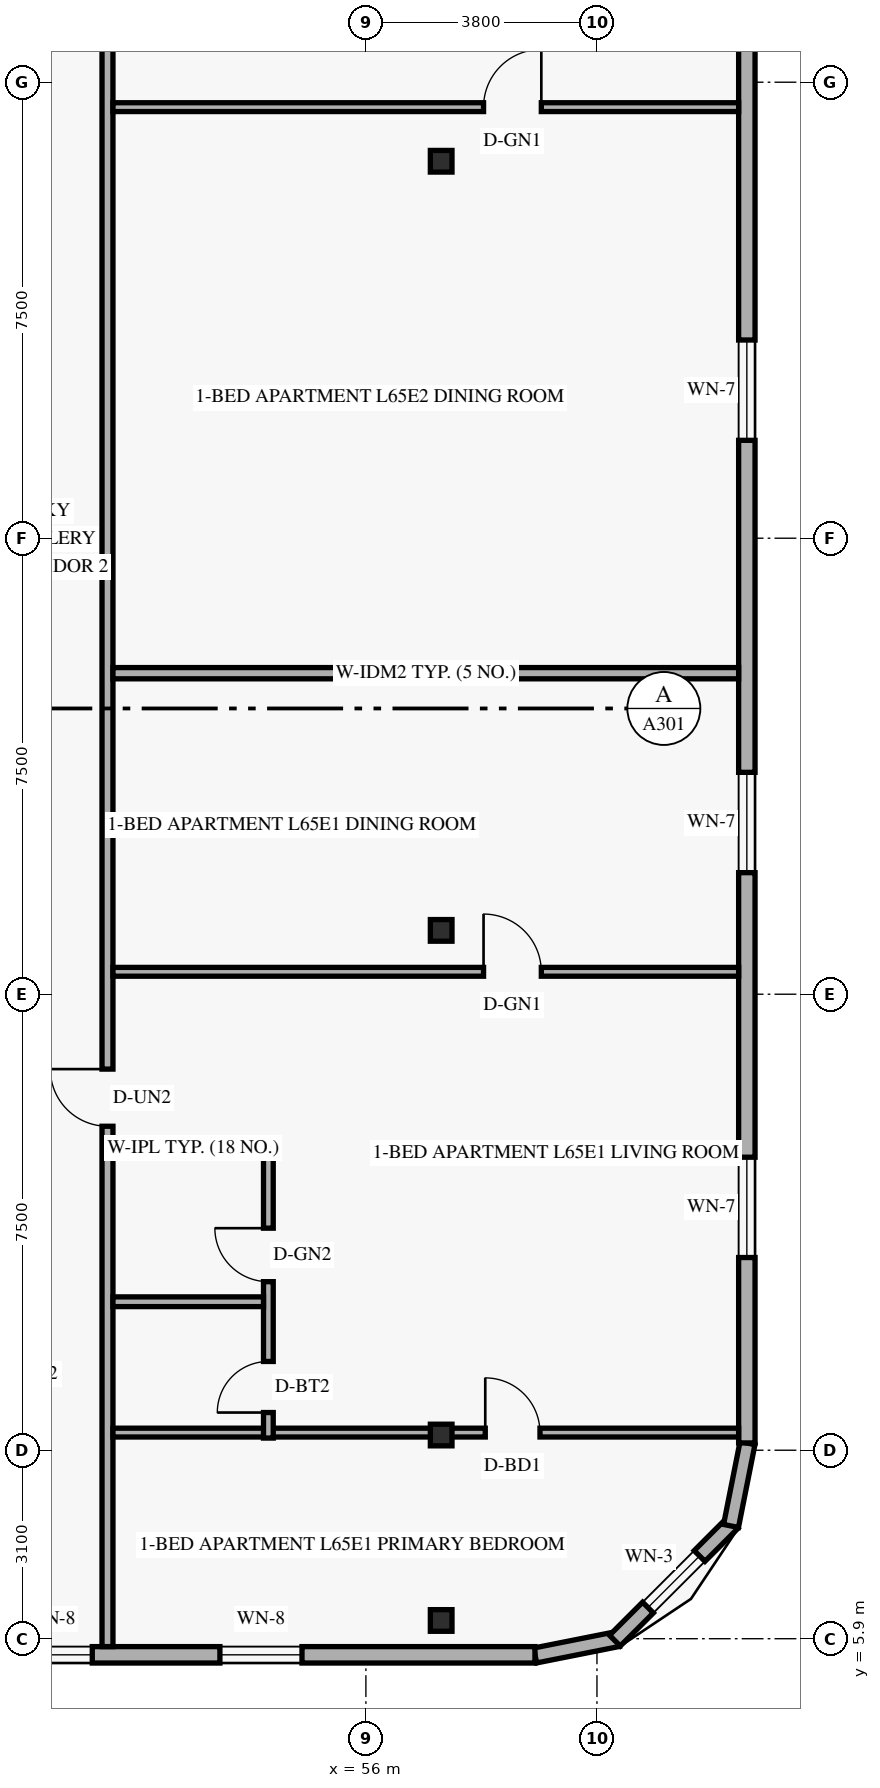
"""IFC4 building model, lengths in metres.
Left out: names, types, materials, properties, quantities, classifications, styles, units other than length and angle.
Written with IfcOpenShell. Run it as: python <this file> out.ifc"""

import sys

from ifc_helpers import new_model, si_unit, direction, frame, frame_2d, origin, origin_2d, place, context, subcontext, project, spatial, rectangle, hollow_rectangle, extrude, element, fill, save


model = new_model("IFC4")
c1 = context("Model", 3, precision=1e-05, world=origin(), true_north=direction((0.0, 1.0)))
c2 = subcontext(c1, "Body", "Model", "MODEL_VIEW")
j1 = project(units=[si_unit("LENGTHUNIT", "METRE"), si_unit("PLANEANGLEUNIT", "RADIAN")], contexts=[c1])
p1 = place(None, origin())
s1 = spatial("IfcSite", under=j1, at=p1, CompositionType="ELEMENT")
p2 = place(p1, origin())
s2 = spatial("IfcBuilding", under=s1, at=p2, CompositionType="ELEMENT")
p3 = place(p2, frame((0.0, 0.0, 249.6)))
s3 = spatial("IfcBuildingStorey", under=s2, at=p3, CompositionType="ELEMENT", Elevation=249.6)
for number, where, z_axis, x_axis in (
    (1, (57.134, 6.2, 0.0), (0.058, 0.0, 0.998), (0.0, 1.0, 0.0)),
    (2, (57.134, 9.25, 0.0), (0.058, 0.0, 0.998), (0.0, 1.0, 0.0)),
    (3, (57.134, 17.55, 0.0), (0.058, 0.0, 0.998), (0.0, 1.0, 0.0)),
    (4, (57.134, 30.2, 0.0), (0.058, 0.0, 0.998), (0.0, 1.0, 0.0)),
):
    element("IfcColumn", number, at=place(p3, frame(where, z_axis=z_axis, x_axis=x_axis)), inside=s3, PredefinedType="COLUMN", context=c2, shape_type="SweptSolid", body=[
        extrude(hollow_rectangle(XDim=0.356, YDim=0.356, WallThickness=0.016, at=origin_2d()), origin(), (0.0, 0.0, 1.0), 3.606),
    ])
p4 = place(p3, frame((58.783, 5.624, 0.0), z_axis=(0.0, 0.0, 1.0), x_axis=(0.980809899341, 0.19496651342, 0.0)))
e5 = element("IfcWall", 5, at=p4, inside=s3, PredefinedType="SOLIDWALL", context=c2, shape_type="SweptSolid", body=[
    extrude(rectangle(XDim=1.389, YDim=0.25, at=frame_2d((0.694, 0.0))), origin(), (0.0, 0.0, 1.0), 3.36),
])
p5 = place(p3, frame((60.095, 5.868, 0.0), z_axis=(0.0, 0.0, 1.0), x_axis=(0.707106781187, 0.707106781187, 0.0)))
e6 = element("IfcWall", 6, at=p5, inside=s3, PredefinedType="SOLIDWALL", context=c2, shape_type="SweptSolid", body=[
    extrude(rectangle(XDim=2.739, YDim=0.25, at=frame_2d((1.37, 0.0))), origin(), (0.0, 0.0, 1.0), 3.36),
])
p6 = place(p5, frame((0.77, 0.0, 0.85)))
e7 = element("IfcOpeningElement", 7, at=p6, cuts=e6, PredefinedType="OPENING", context=c2, shape_type="SweptSolid", body=[
    extrude(rectangle(XDim=1.2, YDim=1.5, at=frame_2d((0.6, 0.75))), frame((0.0, 0.135, 0.0), z_axis=(0.0, -1.0, 0.0), x_axis=(1.0, 0.0, 0.0)), (0.0, 0.0, 1.0), 0.27),
])
p7 = place(p3, frame((62.005, 7.754, 0.0), z_axis=(0.0, 0.0, 1.0), x_axis=(0.195135625965, 0.9807762678, 0.0)))
e8 = element("IfcWall", 8, at=p7, inside=s3, PredefinedType="SOLIDWALL", context=c2, shape_type="SweptSolid", body=[
    extrude(rectangle(XDim=1.389, YDim=0.25, at=frame_2d((0.694, 0.0))), origin(), (0.0, 0.0, 1.0), 3.36),
])
p8 = place(p3, frame((25.82, 5.635, 0.0), z_axis=(0.0, 0.0, 1.0), x_axis=(1.0, 0.0, 0.0)))
e9 = element("IfcWall", 9, at=p8, inside=s3, PredefinedType="SOLIDWALL", context=c2, shape_type="SweptSolid", body=[
    extrude(rectangle(XDim=32.96, YDim=0.27, at=frame_2d((16.48, 0.0))), origin(), (0.0, 0.0, 1.0), 3.36),
])
p9 = place(p8, frame((3.795, 0.0, 0.85)))
e10 = element("IfcOpeningElement", 10, at=p9, cuts=e9, PredefinedType="OPENING", context=c2, shape_type="SweptSolid", body=[
    extrude(rectangle(XDim=1.35, YDim=1.55, at=frame_2d((0.675, 0.775))), frame((0.0, 0.145, 0.0), z_axis=(0.0, -1.0, 0.0), x_axis=(1.0, 0.0, 0.0)), (0.0, 0.0, 1.0), 0.29),
])
p10 = place(p8, frame((19.615, 0.0, 0.85)))
e11 = element("IfcOpeningElement", 11, at=p10, cuts=e9, PredefinedType="OPENING", context=c2, shape_type="SweptSolid", body=[
    extrude(rectangle(XDim=1.35, YDim=1.55, at=frame_2d((0.675, 0.775))), frame((0.0, 0.145, 0.0), z_axis=(0.0, -1.0, 0.0), x_axis=(1.0, 0.0, 0.0)), (0.0, 0.0, 1.0), 0.29),
])
p11 = place(p8, frame((24.33, 0.0, 0.85)))
e12 = element("IfcOpeningElement", 12, at=p11, cuts=e9, PredefinedType="OPENING", context=c2, shape_type="SweptSolid", body=[
    extrude(rectangle(XDim=1.35, YDim=1.55, at=frame_2d((0.675, 0.775))), frame((0.0, 0.145, 0.0), z_axis=(0.0, -1.0, 0.0), x_axis=(1.0, 0.0, 0.0)), (0.0, 0.0, 1.0), 0.29),
])
p12 = place(p8, frame((27.779, 0.0, 0.85)))
e13 = element("IfcOpeningElement", 13, at=p12, cuts=e9, PredefinedType="OPENING", context=c2, shape_type="SweptSolid", body=[
    extrude(rectangle(XDim=1.35, YDim=1.55, at=frame_2d((0.675, 0.775))), frame((0.0, 0.145, 0.0), z_axis=(0.0, -1.0, 0.0), x_axis=(1.0, 0.0, 0.0)), (0.0, 0.0, 1.0), 0.29),
])
p13 = place(p3, frame((62.265, 9.12, 0.0), z_axis=(0.0, 0.0, 1.0), x_axis=(0.0, 1.0, 0.0)))
e14 = element("IfcWall", 14, at=p13, inside=s3, PredefinedType="SOLIDWALL", context=c2, shape_type="SweptSolid", body=[
    extrude(rectangle(XDim=29.76, YDim=0.27, at=frame_2d((14.88, 0.0))), origin(), (0.0, 0.0, 1.0), 3.36),
])
p14 = place(p13, frame((3.049, 0.0, 0.85)))
e15 = element("IfcOpeningElement", 15, at=p14, cuts=e14, PredefinedType="OPENING", context=c2, shape_type="SweptSolid", body=[
    extrude(rectangle(XDim=1.65, YDim=1.6, at=frame_2d((0.825, 0.8))), frame((0.0, 0.145, 0.0), z_axis=(0.0, -1.0, 0.0), x_axis=(1.0, 0.0, 0.0)), (0.0, 0.0, 1.0), 0.29),
])
p15 = place(p13, frame((9.379, 0.0, 0.85)))
e16 = element("IfcOpeningElement", 16, at=p15, cuts=e14, PredefinedType="OPENING", context=c2, shape_type="SweptSolid", body=[
    extrude(rectangle(XDim=1.65, YDim=1.6, at=frame_2d((0.825, 0.8))), frame((0.0, 0.145, 0.0), z_axis=(0.0, -1.0, 0.0), x_axis=(1.0, 0.0, 0.0)), (0.0, 0.0, 1.0), 0.29),
])
p16 = place(p13, frame((16.49, 0.0, 0.85)))
e17 = element("IfcOpeningElement", 17, at=p16, cuts=e14, PredefinedType="OPENING", context=c2, shape_type="SweptSolid", body=[
    extrude(rectangle(XDim=1.65, YDim=1.6, at=frame_2d((0.825, 0.8))), frame((0.0, 0.145, 0.0), z_axis=(0.0, -1.0, 0.0), x_axis=(1.0, 0.0, 0.0)), (0.0, 0.0, 1.0), 0.29),
])
p17 = place(p13, frame((25.04, 0.0, 0.85)))
e18 = element("IfcOpeningElement", 18, at=p17, cuts=e14, PredefinedType="OPENING", context=c2, shape_type="SweptSolid", body=[
    extrude(rectangle(XDim=1.65, YDim=1.6, at=frame_2d((0.825, 0.8))), frame((0.0, 0.145, 0.0), z_axis=(0.0, -1.0, 0.0), x_axis=(1.0, 0.0, 0.0)), (0.0, 0.0, 1.0), 0.29),
])
p18 = place(p3, frame((51.75, 5.77, 0.0), z_axis=(0.0, 0.0, 1.0), x_axis=(0.0, 1.0, 0.0)))
e19 = element("IfcWall", 19, at=p18, inside=s3, PredefinedType="STANDARD", context=c2, shape_type="SweptSolid", body=[
    extrude(rectangle(XDim=36.46, YDim=0.18, at=frame_2d((18.23, 0.0))), origin(), (0.0, 0.0, 1.0), 2.803),
])
p19 = place(p18, frame((8.559, 0.0, 0.0)))
e20 = element("IfcOpeningElement", 20, at=p19, cuts=e19, PredefinedType="OPENING", context=c2, shape_type="SweptSolid", body=[
    extrude(rectangle(XDim=0.94, YDim=2.15, at=frame_2d((0.47, 1.075))), frame((0.0, 0.1, 0.0), z_axis=(0.0, -1.0, 0.0), x_axis=(1.0, 0.0, 0.0)), (0.0, 0.0, 1.0), 0.2),
])
p20 = place(p18, frame((26.933, 0.0, 0.0)))
e21 = element("IfcOpeningElement", 21, at=p20, cuts=e19, PredefinedType="OPENING", context=c2, shape_type="SweptSolid", body=[
    extrude(rectangle(XDim=0.94, YDim=2.15, at=frame_2d((0.47, 1.075))), frame((0.0, 0.1, 0.0), z_axis=(0.0, -1.0, 0.0), x_axis=(1.0, 0.0, 0.0)), (0.0, 0.0, 1.0), 0.2),
])
p21 = place(p3, frame((51.84, 9.29, 0.0), z_axis=(0.0, 0.0, 1.0), x_axis=(1.0, 0.0, 0.0)))
e22 = element("IfcWall", 22, at=p21, inside=s3, PredefinedType="PARTITIONING", context=c2, shape_type="SweptSolid", body=[
    extrude(rectangle(XDim=10.29, YDim=0.145, at=frame_2d((5.145, 0.0))), origin(), (0.0, 0.0, 1.0), 2.803),
])
p22 = place(p21, frame((6.123, 0.0, 0.0)))
e23 = element("IfcOpeningElement", 23, at=p22, cuts=e22, PredefinedType="OPENING", context=c2, shape_type="SweptSolid", body=[
    extrude(rectangle(XDim=0.9, YDim=2.14, at=frame_2d((0.45, 1.07))), frame((0.0, 0.083, 0.0), z_axis=(0.0, -1.0, 0.0), x_axis=(1.0, 0.0, 0.0)), (0.0, 0.0, 1.0), 0.165),
])
p23 = place(p3, frame((51.84, 13.969, 0.0), z_axis=(0.0, 0.0, 1.0), x_axis=(1.0, 0.0, 0.0)))
e24 = element("IfcWall", 24, at=p23, inside=s3, PredefinedType="PLUMBINGWALL", context=c2, shape_type="SweptSolid", body=[
    extrude(rectangle(XDim=2.636, YDim=0.16, at=frame_2d((1.318, 0.0))), origin(), (0.0, 0.0, 1.0), 3.36),
])
p24 = place(p3, frame((54.396, 9.2, 0.0), z_axis=(0.0, 0.0, 1.0), x_axis=(0.0, 1.0, 0.0)))
e25 = element("IfcWall", 25, at=p24, inside=s3, PredefinedType="PLUMBINGWALL", context=c2, shape_type="SweptSolid", body=[
    extrude(rectangle(XDim=4.859, YDim=0.16, at=frame_2d((2.429, 0.0))), origin(), (0.0, 0.0, 1.0), 2.803),
])
p25 = place(p24, frame((0.42, 0.0, 0.0)))
e26 = element("IfcOpeningElement", 26, at=p25, cuts=e25, PredefinedType="OPENING", context=c2, shape_type="SweptSolid", body=[
    extrude(rectangle(XDim=0.84, YDim=2.12, at=frame_2d((0.42, 1.06))), frame((0.0, 0.09, 0.0), z_axis=(0.0, -1.0, 0.0), x_axis=(1.0, 0.0, 0.0)), (0.0, 0.0, 1.0), 0.18),
])
p26 = place(p24, frame((2.572, 0.0, 0.0)))
e27 = element("IfcOpeningElement", 27, at=p26, cuts=e25, PredefinedType="OPENING", context=c2, shape_type="SweptSolid", body=[
    extrude(rectangle(XDim=0.88, YDim=2.12, at=frame_2d((0.44, 1.06))), frame((0.0, 0.09, 0.0), z_axis=(0.0, -1.0, 0.0), x_axis=(1.0, 0.0, 0.0)), (0.0, 0.0, 1.0), 0.18),
])
p27 = place(p3, frame((51.84, 11.442, 0.0), z_axis=(0.0, 0.0, 1.0), x_axis=(1.0, 0.0, 0.0)))
e28 = element("IfcWall", 28, at=p27, inside=s3, PredefinedType="PLUMBINGWALL", context=c2, shape_type="SweptSolid", body=[
    extrude(rectangle(XDim=2.476, YDim=0.16, at=frame_2d((1.238, 0.0))), origin(), (0.0, 0.0, 1.0), 3.36),
])
p28 = place(p3, frame((51.84, 16.869, 0.0), z_axis=(0.0, 0.0, 1.0), x_axis=(1.0, 0.0, 0.0)))
e29 = element("IfcWall", 29, at=p28, inside=s3, PredefinedType="PARTITIONING", context=c2, shape_type="SweptSolid", body=[
    extrude(rectangle(XDim=10.29, YDim=0.145, at=frame_2d((5.145, 0.0))), origin(), (0.0, 0.0, 1.0), 2.879),
])
p29 = place(p28, frame((6.095, 0.0, 0.0)))
e30 = element("IfcOpeningElement", 30, at=p29, cuts=e29, PredefinedType="OPENING", context=c2, shape_type="SweptSolid", body=[
    extrude(rectangle(XDim=0.95, YDim=2.15, at=frame_2d((0.475, 1.075))), frame((0.0, 0.083, 0.0), z_axis=(0.0, -1.0, 0.0), x_axis=(1.0, 0.0, 0.0)), (0.0, 0.0, 1.0), 0.165),
])
p30 = place(p3, frame((51.84, 21.78, 0.0), z_axis=(0.0, 0.0, 1.0), x_axis=(1.0, 0.0, 0.0)))
e31 = element("IfcWall", 31, at=p30, inside=s3, PredefinedType="PARTITIONING", context=c2, shape_type="SweptSolid", body=[
    extrude(rectangle(XDim=10.29, YDim=0.185, at=frame_2d((5.145, 0.0))), origin(), (0.0, 0.0, 1.0), 2.879),
])
p31 = place(p3, frame((51.84, 31.09, 0.0), z_axis=(0.0, 0.0, 1.0), x_axis=(1.0, 0.0, 0.0)))
e32 = element("IfcWall", 32, at=p31, inside=s3, PredefinedType="PARTITIONING", context=c2, shape_type="SweptSolid", body=[
    extrude(rectangle(XDim=10.29, YDim=0.145, at=frame_2d((5.145, 0.0))), origin(), (0.0, 0.0, 1.0), 2.879),
])
p32 = place(p31, frame((6.095, 0.0, 0.0)))
e33 = element("IfcOpeningElement", 33, at=p32, cuts=e32, PredefinedType="OPENING", context=c2, shape_type="SweptSolid", body=[
    extrude(rectangle(XDim=0.95, YDim=2.15, at=frame_2d((0.475, 1.075))), frame((0.0, 0.083, 0.0), z_axis=(0.0, -1.0, 0.0), x_axis=(1.0, 0.0, 0.0)), (0.0, 0.0, 1.0), 0.165),
])
p33 = place(p6, origin())
e34 = element("IfcWindow", 34, at=p33, inside=s3, PartitioningType="SINGLE_PANEL", PredefinedType="WINDOW", context=c2, shape_type="SweptSolid", body=[
    extrude(rectangle(XDim=1.2, YDim=1.5, at=frame_2d((0.6, 0.75))), frame((0.0, 0.03, 0.0), z_axis=(0.0, -1.0, 0.0), x_axis=(1.0, 0.0, 0.0)), (0.0, 0.0, 1.0), 0.06),
])
fill(e7, e34)
p34 = place(p11, origin())
e35 = element("IfcWindow", 35, at=p34, inside=s3, PartitioningType="SINGLE_PANEL", PredefinedType="WINDOW", context=c2, shape_type="SweptSolid", body=[
    extrude(rectangle(XDim=1.35, YDim=1.55, at=frame_2d((0.675, 0.775))), frame((0.0, 0.03, 0.0), z_axis=(0.0, -1.0, 0.0), x_axis=(1.0, 0.0, 0.0)), (0.0, 0.0, 1.0), 0.06),
])
fill(e12, e35)
p35 = place(p12, origin())
e36 = element("IfcWindow", 36, at=p35, inside=s3, PartitioningType="SINGLE_PANEL", PredefinedType="WINDOW", context=c2, shape_type="SweptSolid", body=[
    extrude(rectangle(XDim=1.35, YDim=1.55, at=frame_2d((0.675, 0.775))), frame((0.0, 0.03, 0.0), z_axis=(0.0, -1.0, 0.0), x_axis=(1.0, 0.0, 0.0)), (0.0, 0.0, 1.0), 0.06),
])
fill(e13, e36)
p36 = place(p14, origin())
e37 = element("IfcWindow", 37, at=p36, inside=s3, PartitioningType="SINGLE_PANEL", PredefinedType="WINDOW", context=c2, shape_type="SweptSolid", body=[
    extrude(rectangle(XDim=1.65, YDim=1.6, at=frame_2d((0.825, 0.8))), frame((0.0, 0.03, 0.0), z_axis=(0.0, -1.0, 0.0), x_axis=(1.0, 0.0, 0.0)), (0.0, 0.0, 1.0), 0.06),
])
fill(e15, e37)
p37 = place(p15, origin())
e38 = element("IfcWindow", 38, at=p37, inside=s3, PartitioningType="SINGLE_PANEL", PredefinedType="WINDOW", context=c2, shape_type="SweptSolid", body=[
    extrude(rectangle(XDim=1.65, YDim=1.6, at=frame_2d((0.825, 0.8))), frame((0.0, 0.03, 0.0), z_axis=(0.0, -1.0, 0.0), x_axis=(1.0, 0.0, 0.0)), (0.0, 0.0, 1.0), 0.06),
])
fill(e16, e38)
p38 = place(p16, origin())
e39 = element("IfcWindow", 39, at=p38, inside=s3, PartitioningType="SINGLE_PANEL", PredefinedType="WINDOW", context=c2, shape_type="SweptSolid", body=[
    extrude(rectangle(XDim=1.65, YDim=1.6, at=frame_2d((0.825, 0.8))), frame((0.0, 0.03, 0.0), z_axis=(0.0, -1.0, 0.0), x_axis=(1.0, 0.0, 0.0)), (0.0, 0.0, 1.0), 0.06),
])
fill(e17, e39)
p39 = place(p29, origin())
e40 = element("IfcDoor", 40, at=p39, inside=s3, OperationType="SINGLE_SWING_LEFT", PredefinedType="DOOR", context=c2, shape_type="SweptSolid", body=[
    extrude(rectangle(XDim=0.95, YDim=2.15, at=frame_2d((0.475, 1.075))), frame((0.0, 0.025, 0.0), z_axis=(0.0, -1.0, 0.0), x_axis=(1.0, 0.0, 0.0)), (0.0, 0.0, 1.0), 0.05),
])
fill(e30, e40)
p40 = place(p19, origin())
e41 = element("IfcDoor", 41, at=p40, inside=s3, OperationType="SINGLE_SWING_RIGHT", PredefinedType="DOOR", context=c2, shape_type="SweptSolid", body=[
    extrude(rectangle(XDim=0.94, YDim=2.15, at=frame_2d((0.47, 1.075))), frame((0.0, 0.025, 0.0), z_axis=(0.0, -1.0, 0.0), x_axis=(1.0, 0.0, 0.0)), (0.0, 0.0, 1.0), 0.05),
])
fill(e20, e41)
p41 = place(p25, origin())
e42 = element("IfcDoor", 42, at=p41, inside=s3, OperationType="SINGLE_SWING_LEFT", PredefinedType="DOOR", context=c2, shape_type="SweptSolid", body=[
    extrude(rectangle(XDim=0.84, YDim=2.12, at=frame_2d((0.42, 1.06))), frame((0.0, 0.025, 0.0), z_axis=(0.0, -1.0, 0.0), x_axis=(1.0, 0.0, 0.0)), (0.0, 0.0, 1.0), 0.05),
])
fill(e26, e42)
p42 = place(p26, origin())
e43 = element("IfcDoor", 43, at=p42, inside=s3, OperationType="SINGLE_SWING_RIGHT", PredefinedType="DOOR", context=c2, shape_type="SweptSolid", body=[
    extrude(rectangle(XDim=0.88, YDim=2.12, at=frame_2d((0.44, 1.06))), frame((0.0, 0.025, 0.0), z_axis=(0.0, -1.0, 0.0), x_axis=(1.0, 0.0, 0.0)), (0.0, 0.0, 1.0), 0.05),
])
fill(e27, e43)
p43 = place(p22, origin())
e44 = element("IfcDoor", 44, at=p43, inside=s3, OperationType="SINGLE_SWING_LEFT", PredefinedType="DOOR", context=c2, shape_type="SweptSolid", body=[
    extrude(rectangle(XDim=0.9, YDim=2.14, at=frame_2d((0.45, 1.07))), frame((0.0, 0.025, 0.0), z_axis=(0.0, -1.0, 0.0), x_axis=(1.0, 0.0, 0.0)), (0.0, 0.0, 1.0), 0.05),
])
fill(e23, e44)
p44 = place(p32, origin())
e45 = element("IfcDoor", 45, at=p44, inside=s3, OperationType="SINGLE_SWING_RIGHT", PredefinedType="DOOR", context=c2, shape_type="SweptSolid", body=[
    extrude(rectangle(XDim=0.95, YDim=2.15, at=frame_2d((0.475, 1.075))), frame((0.0, 0.025, 0.0), z_axis=(0.0, -1.0, 0.0), x_axis=(1.0, 0.0, 0.0)), (0.0, 0.0, 1.0), 0.05),
])
fill(e33, e45)
save(model, sys.argv[1])
